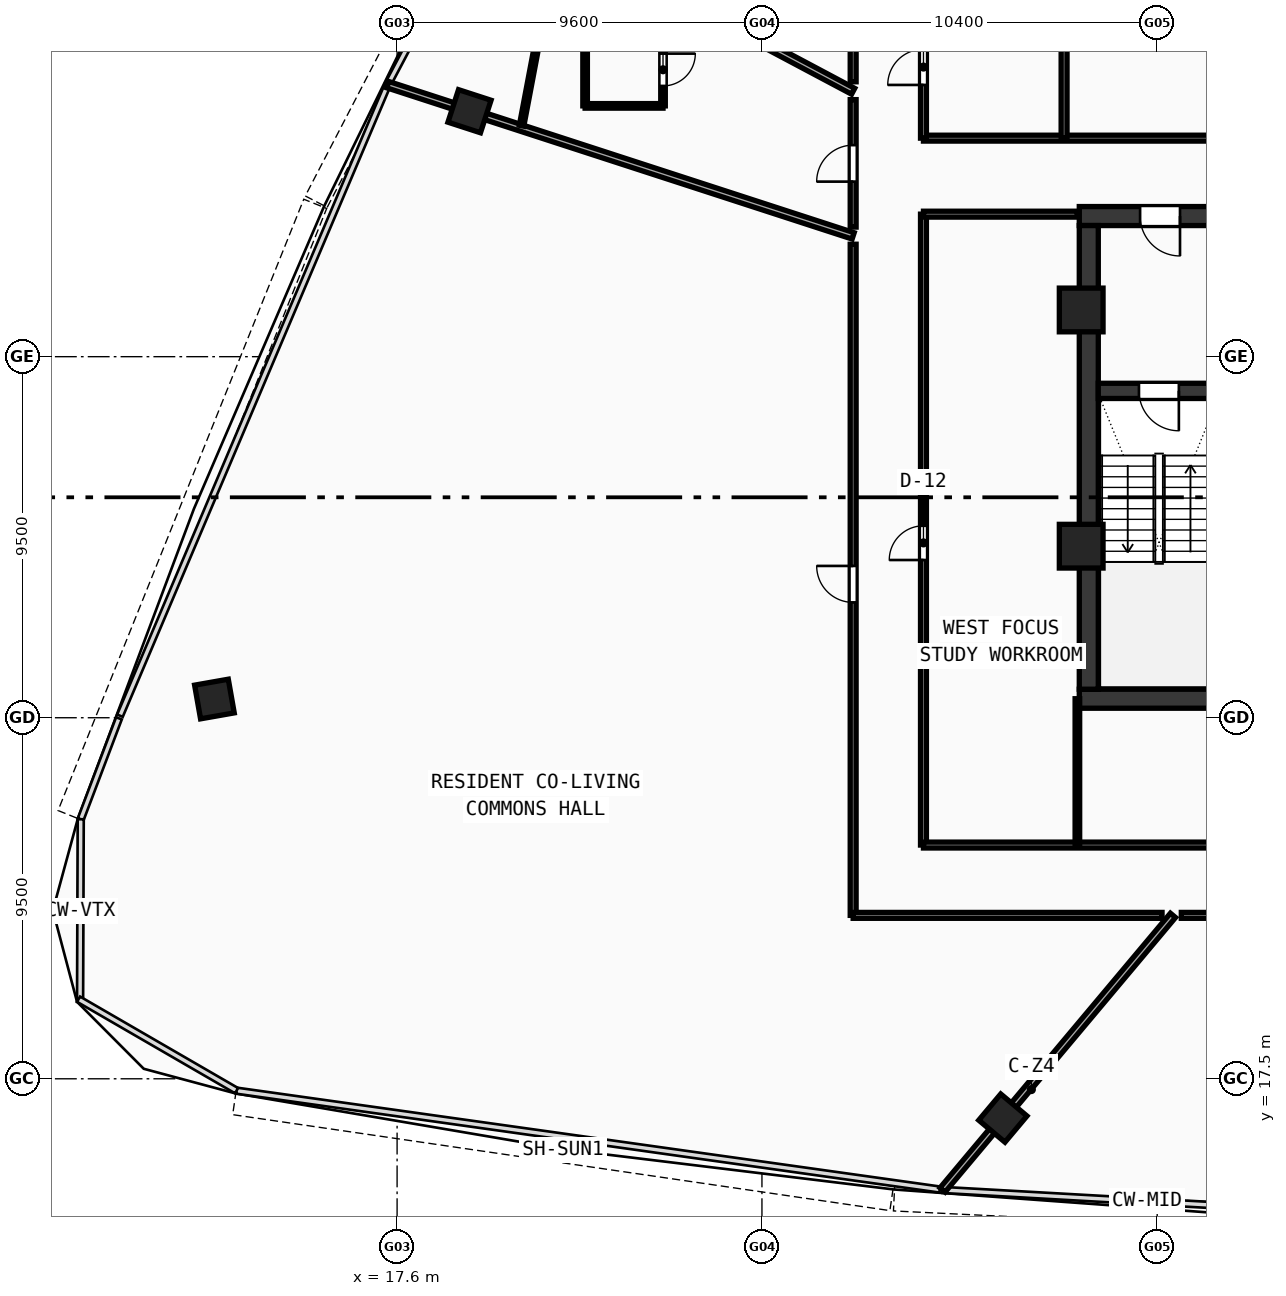
"""IFC4 building model, lengths in metres.
Left out: names, types, materials, properties, quantities, classifications, styles, units other than length and angle.
Written with IfcOpenShell. Run it as: python <this file> out.ifc"""

import sys

from ifc_helpers import new_model, si_unit, direction, frame, frame_2d, origin, origin_with_axes, origin_2d, place, context, subcontext, project, spatial, rectangle, hollow_rectangle, extrude, source, transform, mapped, element, fill, save


model = new_model("IFC4")
c1 = context("Model", 3, precision=1e-05, world=origin(), true_north=direction((0.0, 1.0)))
c2 = subcontext(c1, "Body", "Model", "MODEL_VIEW")
j1 = project(units=[si_unit("LENGTHUNIT", "METRE"), si_unit("PLANEANGLEUNIT", "RADIAN")], contexts=[c1])
p1 = place(None, origin())
s1 = spatial("IfcSite", under=j1, at=p1, CompositionType="ELEMENT")
p2 = place(p1, origin())
s2 = spatial("IfcBuilding", under=s1, at=p2, CompositionType="ELEMENT")
p3 = place(p2, frame((0.0, 0.0, 184.76)))
s3 = spatial("IfcBuildingStorey", under=s2, at=p3, CompositionType="ELEMENT", Elevation=184.76)
p4 = place(p3, frame((35.55, 27.5, 0.0), z_axis=(0.0, 0.0, 1.0), x_axis=(1.0, 0.0, 0.0)))
e1 = element("IfcWall", 1, at=p4, inside=s3, PredefinedType="SHEAR", context=c2, shape_type="SweptSolid", body=[
    extrude(rectangle(XDim=24.9, YDim=0.5, at=frame_2d((12.45, 0.0))), origin(), (0.0, 0.0, 1.0), 3.54),
])
p5 = place(p3, frame((35.55, 40.2, 0.0), z_axis=(0.0, 0.0, 1.0), x_axis=(1.0, 0.0, 0.0)))
e2 = element("IfcWall", 2, at=p5, inside=s3, PredefinedType="SHEAR", context=c2, shape_type="SweptSolid", body=[
    extrude(rectangle(XDim=11.25, YDim=0.5, at=frame_2d((5.625, 0.0))), origin(), (0.0, 0.0, 1.0), 3.54),
])
p6 = place(p5, frame((1.6, 0.0, 0.0)))
e3 = element("IfcOpeningElement", 3, at=p6, cuts=e2, PredefinedType="OPENING", context=c2, shape_type="SweptSolid", body=[
    extrude(rectangle(XDim=1.05, YDim=2.1, at=frame_2d((0.525, 1.05))), frame((0.0, 0.26, 0.0), z_axis=(0.0, -1.0, 0.0), x_axis=(1.0, 0.0, 0.0)), (0.0, 0.0, 1.0), 0.52),
])
p7 = place(p3, frame((35.8, 27.75, 0.0), z_axis=(0.0, 0.0, 1.0), x_axis=(0.0, 1.0, 0.0)))
e4 = element("IfcWall", 4, at=p7, inside=s3, PredefinedType="SHEAR", context=c2, shape_type="SweptSolid", body=[
    extrude(rectangle(XDim=12.2, YDim=0.5, at=frame_2d((6.1, 0.0))), origin(), (0.0, 0.0, 1.0), 3.54),
])
p8 = place(p3, frame((36.05, 35.6, 0.0), z_axis=(0.0, 0.0, 1.0), x_axis=(1.0, 0.0, 0.0)))
e5 = element("IfcWall", 5, at=p8, inside=s3, PredefinedType="SHEAR", context=c2, shape_type="SweptSolid", body=[
    extrude(rectangle(XDim=3.15, YDim=0.4, at=frame_2d((1.575, 0.0))), origin(), (0.0, 0.0, 1.0), 3.54),
])
p9 = place(p8, frame((1.07, 0.0, 0.0)))
e6 = element("IfcOpeningElement", 6, at=p9, cuts=e5, PredefinedType="OPENING", context=c2, shape_type="SweptSolid", body=[
    extrude(rectangle(XDim=1.05, YDim=2.1, at=frame_2d((0.525, 1.05))), frame((0.0, 0.21, 0.0), z_axis=(0.0, -1.0, 0.0), x_axis=(1.0, 0.0, 0.0)), (0.0, 0.0, 1.0), 0.42),
])
m1 = source(origin(), c2, "Body", "SweptSolid", [
    extrude(hollow_rectangle(XDim=1.15, YDim=1.15, WallThickness=0.048, at=origin_2d()), origin(), (0.0, 0.0, 1.0), 3.8),
])
for number, where, z_axis, x_axis in (
    (7, (35.6, 37.729, -0.26), (0.0, 0.0, 1.0), (1.0, 0.0, 0.0)),
    (8, (35.6, 31.513, -0.26), (0.0, 0.0, 1.0), (1.0, 0.0, 0.0)),
):
    element("IfcColumn", number, at=place(p3, frame(where, z_axis=z_axis, x_axis=x_axis)), inside=s3, PredefinedType="COLUMN", context=c2, shape_type="MappedRepresentation", body=[
        mapped(m1, transform((0.0, 0.0, 0.0), scale=1.0)),
    ])
m2 = source(origin(), c2, "Body", "SweptSolid", [
    extrude(hollow_rectangle(XDim=0.9, YDim=0.9, WallThickness=0.036, at=origin_2d()), origin(), (0.0, 0.0, 1.0), 3.8),
])
for number, where, z_axis, x_axis in (
    (9, (33.539, 16.466, -0.26), (0.0, 0.0, 1.0), (0.766, -0.643, 0.0)),
    (10, (19.505, 42.958, -0.26), (0.0, 0.0, 1.0), (-0.309, -0.951, 0.0)),
    (11, (12.793, 27.492, -0.26), (0.0, 0.0, 1.0), (0.174, -0.985, 0.0)),
):
    element("IfcColumn", number, at=place(p3, frame(where, z_axis=z_axis, x_axis=x_axis)), inside=s3, PredefinedType="COLUMN", context=c2, shape_type="MappedRepresentation", body=[
        mapped(m2, transform((0.0, 0.0, 0.0), scale=1.0)),
    ])
p10 = place(p3, frame((31.45, 42.25, 0.0), z_axis=(0.0, 0.0, 1.0), x_axis=(1.0, 0.0, 0.0)))
e12 = element("IfcWall", 12, at=p10, inside=s3, PredefinedType="PARTITIONING", context=c2, shape_type="SweptSolid", body=[
    extrude(rectangle(XDim=33.1, YDim=0.155, at=frame_2d((16.55, 0.0))), origin(), (0.0, 0.0, 1.0), 2.89),
])
p11 = place(p3, frame((31.45, 42.25, 0.0), z_axis=(0.0, 0.0, 1.0), x_axis=(0.0, 1.0, 0.0)))
e13 = element("IfcWall", 13, at=p11, inside=s3, PredefinedType="PARTITIONING", context=c2, shape_type="SweptSolid", body=[
    extrude(rectangle(XDim=11.7, YDim=0.155, at=frame_2d((5.85, 0.0))), origin(), (0.0, 0.0, 1.0), 2.89),
])
p12 = place(p11, frame((1.4, 0.0, 0.0)))
e14 = element("IfcOpeningElement", 14, at=p12, cuts=e13, PredefinedType="OPENING", context=c2, shape_type="SweptSolid", body=[
    extrude(rectangle(XDim=0.94, YDim=2.1, at=frame_2d((0.47, 1.05))), frame((0.0, 0.087, 0.0), z_axis=(0.0, -1.0, 0.0), x_axis=(1.0, 0.0, 0.0)), (0.0, 0.0, 1.0), 0.175),
])
p13 = place(p11, frame((6.8, 0.0, 0.0)))
e15 = element("IfcOpeningElement", 15, at=p13, cuts=e13, PredefinedType="OPENING", context=c2, shape_type="SweptSolid", body=[
    extrude(rectangle(XDim=0.92, YDim=2.1, at=frame_2d((0.46, 1.05))), frame((0.0, 0.087, 0.0), z_axis=(0.0, -1.0, 0.0), x_axis=(1.0, 0.0, 0.0)), (0.0, 0.0, 1.0), 0.175),
])
p14 = place(p3, frame((35.15, 42.25, 0.0), z_axis=(0.0, 0.0, 1.0), x_axis=(0.0, 1.0, 0.0)))
e16 = element("IfcWall", 16, at=p14, inside=s3, PredefinedType="PARTITIONING", context=c2, shape_type="SweptSolid", body=[
    extrude(rectangle(XDim=11.7, YDim=0.155, at=frame_2d((5.85, 0.0))), origin(), (0.0, 0.0, 1.0), 2.89),
])
p15 = place(p3, frame((31.45, 23.65, 0.0), z_axis=(0.0, 0.0, 1.0), x_axis=(0.0, 1.0, 0.0)))
e17 = element("IfcWall", 17, at=p15, inside=s3, PredefinedType="PARTITIONING", context=c2, shape_type="SweptSolid", body=[
    extrude(rectangle(XDim=16.6, YDim=0.155, at=frame_2d((8.3, 0.0))), origin(), (0.0, 0.0, 1.0), 2.89),
])
p16 = place(p15, frame((7.5, 0.0, 0.0)))
e18 = element("IfcOpeningElement", 18, at=p16, cuts=e17, PredefinedType="OPENING", context=c2, shape_type="SweptSolid", body=[
    extrude(rectangle(XDim=0.9, YDim=2.08, at=frame_2d((0.45, 1.04))), frame((0.0, 0.087, 0.0), z_axis=(0.0, -1.0, 0.0), x_axis=(1.0, 0.0, 0.0)), (0.0, 0.0, 1.0), 0.175),
])
p17 = place(p3, frame((31.45, 23.65, 0.0), z_axis=(0.0, 0.0, 1.0), x_axis=(1.0, 0.0, 0.0)))
e19 = element("IfcWall", 19, at=p17, inside=s3, PredefinedType="PARTITIONING", context=c2, shape_type="SweptSolid", body=[
    extrude(rectangle(XDim=33.1, YDim=0.155, at=frame_2d((16.55, 0.0))), origin(), (0.0, 0.0, 1.0), 2.89),
])
p18 = place(p17, frame((16.0, 0.0, 0.0)))
e20 = element("IfcOpeningElement", 20, at=p18, cuts=e19, PredefinedType="OPENING", context=c2, shape_type="SweptSolid", body=[
    extrude(rectangle(XDim=0.92, YDim=2.1, at=frame_2d((0.46, 1.05))), frame((0.0, 0.087, 0.0), z_axis=(0.0, -1.0, 0.0), x_axis=(1.0, 0.0, 0.0)), (0.0, 0.0, 1.0), 0.175),
])
p19 = place(p3, frame((31.45, 40.25, 0.0), z_axis=(0.0, 0.0, 1.0), x_axis=(1.0, 0.0, 0.0)))
e21 = element("IfcWall", 21, at=p19, inside=s3, PredefinedType="PARTITIONING", context=c2, shape_type="SweptSolid", body=[
    extrude(rectangle(XDim=4.05, YDim=0.155, at=frame_2d((2.025, 0.0))), origin(), (0.0, 0.0, 1.0), 3.54),
])
p20 = place(p3, frame((35.5, 23.65, 0.0), z_axis=(0.0, 0.0, 1.0), x_axis=(0.0, 1.0, 0.0)))
e22 = element("IfcWall", 22, at=p20, inside=s3, PredefinedType="PARTITIONING", context=c2, shape_type="SweptSolid", body=[
    extrude(rectangle(XDim=3.85, YDim=0.12, at=frame_2d((1.925, 0.0))), origin(), (0.0, 0.0, 1.0), 3.14),
])
p21 = place(p3, frame((29.6, 43.483, 0.0), z_axis=(0.0, 0.0, 1.0), x_axis=(-0.882940086537, 0.469485679853, 0.0)))
e23 = element("IfcWall", 23, at=p21, inside=s3, PredefinedType="PARTITIONING", context=c2, shape_type="SweptSolid", body=[
    extrude(rectangle(XDim=10.91, YDim=0.175, at=frame_2d((5.455, 0.0))), origin(), (0.0, 0.0, 1.0), 2.89),
])
p22 = place(p3, frame((29.6, 39.678, 0.0), z_axis=(0.0, 0.0, 1.0), x_axis=(-0.951054689993, 0.309022615097, 0.0)))
e24 = element("IfcWall", 24, at=p22, inside=s3, PredefinedType="PARTITIONING", context=c2, shape_type="SweptSolid", body=[
    extrude(rectangle(XDim=12.875, YDim=0.175, at=frame_2d((6.438, 0.0))), origin(), (0.0, 0.0, 1.0), 2.89),
])
p23 = place(p3, frame((38.015, 21.8, 0.0), z_axis=(0.0, 0.0, 1.0), x_axis=(-0.642777943688, -0.766052553751, 0.0)))
e25 = element("IfcWall", 25, at=p23, inside=s3, PredefinedType="PARTITIONING", context=c2, shape_type="SweptSolid", body=[
    extrude(rectangle(XDim=9.431, YDim=0.175, at=frame_2d((4.715, 0.0))), origin(), (0.0, 0.0, 1.0), 2.89),
])
p24 = place(p3, frame((29.6, 21.8, 0.0), z_axis=(0.0, 0.0, 1.0), x_axis=(0.0, 1.0, 0.0)))
e26 = element("IfcWall", 26, at=p24, inside=s3, PredefinedType="PARTITIONING", context=c2, shape_type="SweptSolid", body=[
    extrude(rectangle(XDim=17.659, YDim=0.155, at=frame_2d((8.829, 0.0))), origin(), (0.0, 0.0, 1.0), 2.89),
])
p25 = place(p24, frame((8.234, 0.0, 0.0)))
e27 = element("IfcOpeningElement", 27, at=p25, cuts=e26, PredefinedType="OPENING", context=c2, shape_type="SweptSolid", body=[
    extrude(rectangle(XDim=0.96, YDim=2.12, at=frame_2d((0.48, 1.06))), frame((0.0, 0.087, 0.0), z_axis=(0.0, -1.0, 0.0), x_axis=(1.0, 0.0, 0.0)), (0.0, 0.0, 1.0), 0.175),
])
p26 = place(p3, frame((29.6, 39.91, 0.0), z_axis=(0.0, 0.0, 1.0), x_axis=(0.0, 1.0, 0.0)))
e28 = element("IfcWall", 28, at=p26, inside=s3, PredefinedType="PARTITIONING", context=c2, shape_type="SweptSolid", body=[
    extrude(rectangle(XDim=3.354, YDim=0.155, at=frame_2d((1.677, 0.0))), origin(), (0.0, 0.0, 1.0), 3.54),
])
p27 = place(p26, frame((1.196, 0.0, 0.0)))
e29 = element("IfcOpeningElement", 29, at=p27, cuts=e28, PredefinedType="OPENING", context=c2, shape_type="SweptSolid", body=[
    extrude(rectangle(XDim=0.96, YDim=2.12, at=frame_2d((0.48, 1.06))), frame((0.0, 0.087, 0.0), z_axis=(0.0, -1.0, 0.0), x_axis=(1.0, 0.0, 0.0)), (0.0, 0.0, 1.0), 0.175),
])
p28 = place(p3, frame((29.6, 43.733, 0.0), z_axis=(0.0, 0.0, 1.0), x_axis=(0.0, 1.0, 0.0)))
e30 = element("IfcWall", 30, at=p28, inside=s3, PredefinedType="PARTITIONING", context=c2, shape_type="SweptSolid", body=[
    extrude(rectangle(XDim=6.315, YDim=0.155, at=frame_2d((3.157, 0.0))), origin(), (0.0, 0.0, 1.0), 2.89),
])
p29 = place(p28, frame((2.668, 0.0, 0.0)))
e31 = element("IfcOpeningElement", 31, at=p29, cuts=e30, PredefinedType="OPENING", context=c2, shape_type="SweptSolid", body=[
    extrude(rectangle(XDim=0.96, YDim=2.12, at=frame_2d((0.48, 1.06))), frame((0.0, 0.087, 0.0), z_axis=(0.0, -1.0, 0.0), x_axis=(1.0, 0.0, 0.0)), (0.0, 0.0, 1.0), 0.175),
])
p30 = place(p3, frame((44.583, 21.8, 0.0), z_axis=(0.0, 0.0, 1.0), x_axis=(-1.0, 0.0, 0.0)))
e32 = element("IfcWall", 32, at=p30, inside=s3, PredefinedType="PARTITIONING", context=c2, shape_type="SweptSolid", body=[
    extrude(rectangle(XDim=6.349, YDim=0.155, at=frame_2d((3.174, 0.0))), origin(), (0.0, 0.0, 1.0), 2.89),
])
p31 = place(p30, frame((2.696, 0.0, 0.0)))
e33 = element("IfcOpeningElement", 33, at=p31, cuts=e32, PredefinedType="OPENING", context=c2, shape_type="SweptSolid", body=[
    extrude(rectangle(XDim=0.96, YDim=2.12, at=frame_2d((0.48, 1.06))), frame((0.0, 0.087, 0.0), z_axis=(0.0, -1.0, 0.0), x_axis=(1.0, 0.0, 0.0)), (0.0, 0.0, 1.0), 0.175),
])
p32 = place(p3, frame((37.728, 21.8, 0.0), z_axis=(0.0, 0.0, 1.0), x_axis=(-1.0, 0.0, 0.0)))
e34 = element("IfcWall", 34, at=p32, inside=s3, PredefinedType="PARTITIONING", context=c2, shape_type="SweptSolid", body=[
    extrude(rectangle(XDim=8.127, YDim=0.155, at=frame_2d((4.064, 0.0))), origin(), (0.0, 0.0, 1.0), 3.14),
])
p33 = place(p3, frame((22.547, 43.099, 0.0), z_axis=(0.0, 0.0, 1.0), x_axis=(1.0, 0.0, 0.0)))
e35 = element("IfcWall", 35, at=p33, inside=s3, PredefinedType="PARTITIONING", context=c2, shape_type="SweptSolid", body=[
    extrude(rectangle(XDim=2.05, YDim=0.12, at=frame_2d((1.025, 0.0))), origin(), (0.0, 0.0, 1.0), 3.54),
])
p34 = place(p3, frame((24.597, 43.099, 0.0), z_axis=(0.0, 0.0, 1.0), x_axis=(0.0, 1.0, 0.0)))
e36 = element("IfcWall", 36, at=p34, inside=s3, PredefinedType="PARTITIONING", context=c2, shape_type="SweptSolid", body=[
    extrude(rectangle(XDim=1.9, YDim=0.12, at=frame_2d((0.95, 0.0))), origin(), (0.0, 0.0, 1.0), 3.54),
])
p35 = place(p34, frame((0.525, 0.0, 0.0)))
e37 = element("IfcOpeningElement", 37, at=p35, cuts=e36, PredefinedType="OPENING", context=c2, shape_type="SweptSolid", body=[
    extrude(rectangle(XDim=0.85, YDim=2.1, at=frame_2d((0.425, 1.05))), frame((0.0, 0.07, 0.0), z_axis=(0.0, -1.0, 0.0), x_axis=(1.0, 0.0, 0.0)), (0.0, 0.0, 1.0), 0.14),
])
p36 = place(p3, frame((22.547, 44.999, 0.0), z_axis=(0.0, 0.0, 1.0), x_axis=(0.0, -1.0, 0.0)))
e38 = element("IfcWall", 38, at=p36, inside=s3, PredefinedType="PARTITIONING", context=c2, shape_type="SweptSolid", body=[
    extrude(rectangle(XDim=1.9, YDim=0.12, at=frame_2d((0.95, 0.0))), origin(), (0.0, 0.0, 1.0), 3.54),
])
p37 = place(p3, frame((21.818, 47.553, 0.0), z_axis=(0.0, 0.0, 1.0), x_axis=(-0.186234987185, -0.982505231308, 0.0)))
e39 = element("IfcWall", 39, at=p37, inside=s3, PredefinedType="PARTITIONING", context=c2, shape_type="SweptSolid", body=[
    extrude(rectangle(XDim=5.065, YDim=0.12, at=frame_2d((2.533, 0.0))), origin(), (0.0, 0.0, 1.0), 2.89),
])
p38 = place(p37, frame((2.073, 0.0, 0.0)))
e40 = element("IfcOpeningElement", 40, at=p38, cuts=e39, PredefinedType="OPENING", context=c2, shape_type="SweptSolid", body=[
    extrude(rectangle(XDim=0.92, YDim=2.1, at=frame_2d((0.46, 1.05))), frame((0.0, 0.07, 0.0), z_axis=(0.0, -1.0, 0.0), x_axis=(1.0, 0.0, 0.0)), (0.0, 0.0, 1.0), 0.14),
])
m3 = source(origin(), c2, "Body", "SweptSolid", [
    extrude(rectangle(XDim=1.05, YDim=2.1, at=frame_2d((0.525, 1.05))), frame((0.0, 0.025, 0.0), z_axis=(0.0, -1.0, 0.0), x_axis=(1.0, 0.0, 0.0)), (0.0, 0.0, 1.0), 0.05),
])
p39 = place(p9, frame((1.05, 0.0, 0.0), z_axis=(0.0, 0.0, 1.0), x_axis=(-1.0, 0.0, 0.0)))
e41 = element("IfcDoor", 41, at=p39, inside=s3, OperationType="SINGLE_SWING_LEFT", PredefinedType="DOOR", context=c2, shape_type="MappedRepresentation", body=[
    mapped(m3, transform((0.0, 0.0, 0.0), scale=1.0)),
])
fill(e6, e41)
p40 = place(p6, frame((1.05, 0.0, 0.0), z_axis=(0.0, 0.0, 1.0), x_axis=(-1.0, 0.0, 0.0)))
e42 = element("IfcDoor", 42, at=p40, inside=s3, OperationType="SINGLE_SWING_LEFT", PredefinedType="DOOR", context=c2, shape_type="MappedRepresentation", body=[
    mapped(m3, transform((0.0, 0.0, 0.0), scale=1.0)),
])
fill(e3, e42)
m4 = source(origin(), c2, "Body", "SweptSolid", [
    extrude(rectangle(XDim=0.94, YDim=2.1, at=frame_2d((0.47, 1.05))), frame((0.0, 0.025, 0.0), z_axis=(0.0, -1.0, 0.0), x_axis=(1.0, 0.0, 0.0)), (0.0, 0.0, 1.0), 0.05),
])
p41 = place(p12, origin_with_axes())
e43 = element("IfcDoor", 43, at=p41, inside=s3, OperationType="SINGLE_SWING_LEFT", PredefinedType="DOOR", context=c2, shape_type="MappedRepresentation", body=[
    mapped(m4, transform((0.0, 0.0, 0.0), scale=1.0)),
])
fill(e14, e43)
m5 = source(origin(), c2, "Body", "SweptSolid", [
    extrude(rectangle(XDim=0.9, YDim=2.08, at=frame_2d((0.45, 1.04))), frame((0.0, 0.025, 0.0), z_axis=(0.0, -1.0, 0.0), x_axis=(1.0, 0.0, 0.0)), (0.0, 0.0, 1.0), 0.05),
])
p42 = place(p16, origin_with_axes())
e44 = element("IfcDoor", 44, at=p42, inside=s3, OperationType="SINGLE_SWING_LEFT", PredefinedType="DOOR", context=c2, shape_type="MappedRepresentation", body=[
    mapped(m5, transform((0.0, 0.0, 0.0), scale=1.0)),
])
fill(e18, e44)
m6 = source(origin(), c2, "Body", "SweptSolid", [
    extrude(rectangle(XDim=0.96, YDim=2.12, at=frame_2d((0.48, 1.06))), frame((0.0, 0.025, 0.0), z_axis=(0.0, -1.0, 0.0), x_axis=(1.0, 0.0, 0.0)), (0.0, 0.0, 1.0), 0.05),
])
p43 = place(p27, origin_with_axes())
e45 = element("IfcDoor", 45, at=p43, inside=s3, OperationType="SINGLE_SWING_LEFT", PredefinedType="DOOR", context=c2, shape_type="MappedRepresentation", body=[
    mapped(m6, transform((0.0, 0.0, 0.0), scale=1.0)),
])
fill(e29, e45)
m7 = source(origin(), c2, "Body", "SweptSolid", [
    extrude(rectangle(XDim=0.85, YDim=2.1, at=frame_2d((0.425, 1.05))), frame((0.0, 0.025, 0.0), z_axis=(0.0, -1.0, 0.0), x_axis=(1.0, 0.0, 0.0)), (0.0, 0.0, 1.0), 0.05),
])
p44 = place(p35, frame((0.85, 0.0, 0.0), z_axis=(0.0, 0.0, 1.0), x_axis=(-1.0, 0.0, 0.0)))
e46 = element("IfcDoor", 46, at=p44, inside=s3, OperationType="SINGLE_SWING_LEFT", PredefinedType="DOOR", context=c2, shape_type="MappedRepresentation", body=[
    mapped(m7, transform((0.0, 0.0, 0.0), scale=1.0)),
])
fill(e37, e46)
p45 = place(p25, origin_with_axes())
e47 = element("IfcDoor", 47, at=p45, inside=s3, OperationType="SINGLE_SWING_RIGHT", PredefinedType="DOOR", context=c2, shape_type="MappedRepresentation", body=[
    mapped(m6, transform((0.0, 0.0, 0.0), scale=1.0)),
])
fill(e27, e47)
save(model, sys.argv[1])
